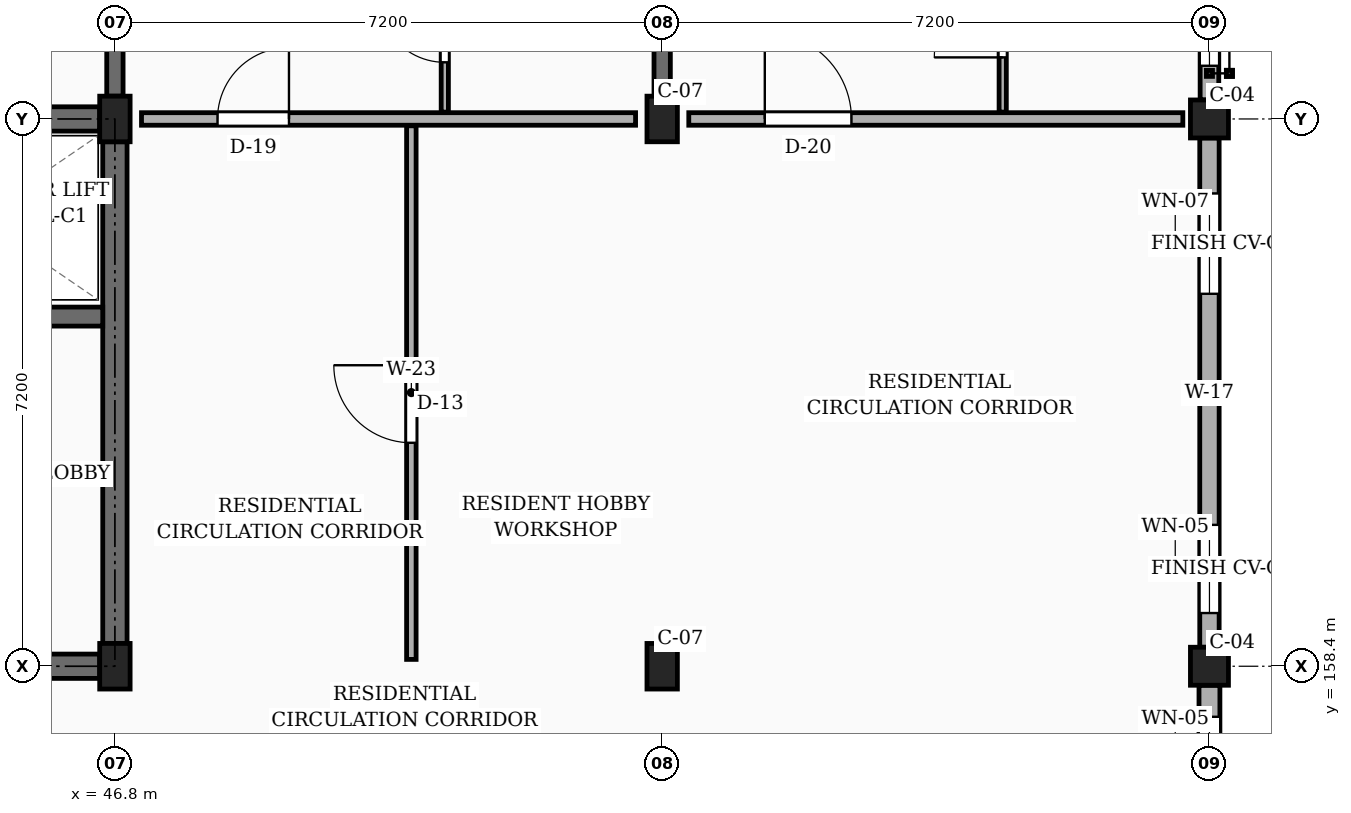
"""IFC4 building model, lengths in metres.
Left out: names, types, materials, properties, quantities, classifications, styles, units other than length and angle.
Written with IfcOpenShell. Run it as: python <this file> out.ifc"""

import sys

from ifc_helpers import new_model, si_unit, direction, frame, frame_2d, origin, origin_2d, place, context, subcontext, project, spatial, rectangle, extrude, element, fill, save


model = new_model("IFC4")
c1 = context("Model", 3, precision=1e-05, world=origin(), true_north=direction((0.0, 1.0)))
c2 = subcontext(c1, "Body", "Model", "MODEL_VIEW")
j1 = project(units=[si_unit("LENGTHUNIT", "METRE"), si_unit("PLANEANGLEUNIT", "RADIAN")], contexts=[c1])
p1 = place(None, origin())
s1 = spatial("IfcSite", under=j1, at=p1, CompositionType="ELEMENT")
p2 = place(p1, origin())
s2 = spatial("IfcBuilding", under=s1, at=p2, CompositionType="ELEMENT")
p3 = place(p2, frame((0.0, 0.0, 32.85)))
s3 = spatial("IfcBuildingStorey", under=s2, at=p3, CompositionType="ELEMENT", Elevation=32.85)
for number, where, z_axis, x_axis in (
    (1, (46.8, 158.4, 0.0), (0.0, 0.0, 1.0), (1.0, 0.0, 0.0)),
    (2, (46.8, 165.6, 0.0), (0.0, 0.0, 1.0), (1.0, 0.0, 0.0)),
    (3, (54.0, 158.4, 0.0), (0.0, 0.0, 1.0), (1.0, 0.0, 0.0)),
    (4, (54.0, 165.6, 0.0), (0.0, 0.0, 1.0), (1.0, 0.0, 0.0)),
):
    element("IfcColumn", number, at=place(p3, frame(where, z_axis=z_axis, x_axis=x_axis)), inside=s3, PredefinedType="COLUMN", context=c2, shape_type="SweptSolid", body=[
        extrude(rectangle(XDim=0.4, YDim=0.6, at=origin_2d()), origin(), (0.0, 0.0, 1.0), 3.15),
    ])
for number, where, z_axis, x_axis in (
    (5, (61.2, 158.4, 0.0), (0.0, 0.0, 1.0), (1.0, 0.0, 0.0)),
    (6, (61.2, 165.6, 0.0), (0.0, 0.0, 1.0), (1.0, 0.0, 0.0)),
):
    element("IfcColumn", number, at=place(p3, frame(where, z_axis=z_axis, x_axis=x_axis)), inside=s3, PredefinedType="COLUMN", context=c2, shape_type="SweptSolid", body=[
        extrude(rectangle(XDim=0.5, YDim=0.5, at=origin_2d()), origin(), (0.0, 0.0, 1.0), 3.15),
    ])
for number, where, z_axis, x_axis in (
    (7, (46.8, 165.9, 0.0), (0.0, 0.0, 1.0), (0.0, 1.0, 0.0)),
    (8, (54.0, 165.9, 0.0), (0.0, 0.0, 1.0), (0.0, 1.0, 0.0)),
):
    element("IfcWall", number, at=place(p3, frame(where, z_axis=z_axis, x_axis=x_axis)), inside=s3, PredefinedType="SOLIDWALL", context=c2, shape_type="SweptSolid", body=[
        extrude(rectangle(XDim=6.65, YDim=0.215, at=frame_2d((3.325, 0.0))), origin(), (0.0, 0.0, 1.0), 2.185),
    ])
p4 = place(p3, frame((61.2, 151.45, 0.0), z_axis=(0.0, 0.0, 1.0), x_axis=(0.0, 1.0, 0.0)))
e9 = element("IfcWall", 9, at=p4, inside=s3, PredefinedType="SOLIDWALL", context=c2, shape_type="SweptSolid", body=[
    extrude(rectangle(XDim=6.7, YDim=0.275, at=frame_2d((3.35, 0.0))), origin(), (0.0, 0.0, 1.0), 2.455),
])
p5 = place(p4, frame((1.995, 0.0, 0.78)))
e10 = element("IfcOpeningElement", 10, at=p5, cuts=e9, PredefinedType="OPENING", context=c2, shape_type="SweptSolid", body=[
    extrude(rectangle(XDim=1.0, YDim=1.15, at=frame_2d((0.5, 0.575))), frame((0.0, 0.147, 0.0), z_axis=(0.0, -1.0, 0.0), x_axis=(1.0, 0.0, 0.0)), (0.0, 0.0, 1.0), 0.295),
])
p6 = place(p4, frame((5.125, 0.0, 0.78)))
e11 = element("IfcOpeningElement", 11, at=p6, cuts=e9, PredefinedType="OPENING", context=c2, shape_type="SweptSolid", body=[
    extrude(rectangle(XDim=1.16, YDim=1.15, at=frame_2d((0.58, 0.575))), frame((0.0, 0.147, 0.0), z_axis=(0.0, -1.0, 0.0), x_axis=(1.0, 0.0, 0.0)), (0.0, 0.0, 1.0), 0.295),
])
p7 = place(p3, frame((61.2, 158.65, 0.0), z_axis=(0.0, 0.0, 1.0), x_axis=(0.0, 1.0, 0.0)))
e12 = element("IfcWall", 12, at=p7, inside=s3, PredefinedType="SOLIDWALL", context=c2, shape_type="SweptSolid", body=[
    extrude(rectangle(XDim=6.7, YDim=0.255, at=frame_2d((3.35, 0.0))), origin(), (0.0, 0.0, 1.0), 2.455),
])
p8 = place(p7, frame((0.45, 0.0, 0.78)))
e13 = element("IfcOpeningElement", 13, at=p8, cuts=e12, PredefinedType="OPENING", context=c2, shape_type="SweptSolid", body=[
    extrude(rectangle(XDim=1.16, YDim=1.15, at=frame_2d((0.58, 0.575))), frame((0.0, 0.137, 0.0), z_axis=(0.0, -1.0, 0.0), x_axis=(1.0, 0.0, 0.0)), (0.0, 0.0, 1.0), 0.275),
])
p9 = place(p7, frame((4.65, 0.0, 0.78)))
e14 = element("IfcOpeningElement", 14, at=p9, cuts=e12, PredefinedType="OPENING", context=c2, shape_type="SweptSolid", body=[
    extrude(rectangle(XDim=1.32, YDim=1.15, at=frame_2d((0.66, 0.575))), frame((0.0, 0.137, 0.0), z_axis=(0.0, -1.0, 0.0), x_axis=(1.0, 0.0, 0.0)), (0.0, 0.0, 1.0), 0.275),
])
p10 = place(p3, frame((61.2, 165.85, 0.0), z_axis=(0.0, 0.0, 1.0), x_axis=(0.0, 1.0, 0.0)))
e15 = element("IfcWall", 15, at=p10, inside=s3, PredefinedType="SOLIDWALL", context=c2, shape_type="SweptSolid", body=[
    extrude(rectangle(XDim=6.7, YDim=0.245, at=frame_2d((3.35, 0.0))), origin(), (0.0, 0.0, 1.0), 2.455),
])
p11 = place(p10, frame((0.45, 0.0, 0.78)))
e16 = element("IfcOpeningElement", 16, at=p11, cuts=e15, PredefinedType="OPENING", context=c2, shape_type="SweptSolid", body=[
    extrude(rectangle(XDim=1.32, YDim=1.15, at=frame_2d((0.66, 0.575))), frame((0.0, 0.133, 0.0), z_axis=(0.0, -1.0, 0.0), x_axis=(1.0, 0.0, 0.0)), (0.0, 0.0, 1.0), 0.265),
])
p12 = place(p10, frame((4.65, 0.0, 0.78)))
e17 = element("IfcOpeningElement", 17, at=p12, cuts=e15, PredefinedType="OPENING", context=c2, shape_type="SweptSolid", body=[
    extrude(rectangle(XDim=0.88, YDim=1.26, at=frame_2d((0.44, 0.63))), frame((0.0, 0.133, 0.0), z_axis=(0.0, -1.0, 0.0), x_axis=(1.0, 0.0, 0.0)), (0.0, 0.0, 1.0), 0.265),
])
p13 = place(p3, frame((39.8, 165.6, 0.0), z_axis=(0.0, 0.0, 1.0), x_axis=(1.0, 0.0, 0.0)))
e18 = element("IfcWall", 18, at=p13, inside=s3, PredefinedType="SHEAR", context=c2, shape_type="SweptSolid", body=[
    extrude(rectangle(XDim=6.8, YDim=0.32, at=frame_2d((3.4, 0.0))), origin(), (0.0, 0.0, 1.0), 2.885),
])
p14 = place(p3, frame((46.8, 158.7, 0.0), z_axis=(0.0, 0.0, 1.0), x_axis=(0.0, 1.0, 0.0)))
e19 = element("IfcWall", 19, at=p14, inside=s3, PredefinedType="SHEAR", context=c2, shape_type="SweptSolid", body=[
    extrude(rectangle(XDim=6.6, YDim=0.32, at=frame_2d((3.3, 0.0))), origin(), (0.0, 0.0, 1.0), 2.885),
])
p15 = place(p3, frame((39.8, 158.4, 0.0), z_axis=(0.0, 0.0, 1.0), x_axis=(1.0, 0.0, 0.0)))
e20 = element("IfcWall", 20, at=p15, inside=s3, PredefinedType="SHEAR", context=c2, shape_type="SweptSolid", body=[
    extrude(rectangle(XDim=6.8, YDim=0.32, at=frame_2d((3.4, 0.0))), origin(), (0.0, 0.0, 1.0), 2.885),
])
p16 = place(p15, frame((4.55, 0.0, 0.0)))
e21 = element("IfcOpeningElement", 21, at=p16, cuts=e20, PredefinedType="OPENING", context=c2, shape_type="SweptSolid", body=[
    extrude(rectangle(XDim=1.1, YDim=2.15, at=frame_2d((0.55, 1.075))), frame((0.0, 0.17, 0.0), z_axis=(0.0, -1.0, 0.0), x_axis=(1.0, 0.0, 0.0)), (0.0, 0.0, 1.0), 0.34),
])
p17 = place(p3, frame((43.325, 163.0, 0.0), z_axis=(0.0, 0.0, 1.0), x_axis=(1.0, 0.0, 0.0)))
e22 = element("IfcWall", 22, at=p17, inside=s3, PredefinedType="SHEAR", context=c2, shape_type="SweptSolid", body=[
    extrude(rectangle(XDim=3.315, YDim=0.25, at=frame_2d((1.657, 0.0))), origin(), (0.0, 0.0, 1.0), 2.885),
])
p18 = place(p17, frame((1.1, 0.0, 0.0)))
e23 = element("IfcOpeningElement", 23, at=p18, cuts=e22, PredefinedType="OPENING", context=c2, shape_type="SweptSolid", body=[
    extrude(rectangle(XDim=1.0, YDim=2.2, at=frame_2d((0.5, 1.1))), frame((0.0, 0.135, 0.0), z_axis=(0.0, -1.0, 0.0), x_axis=(1.0, 0.0, 0.0)), (0.0, 0.0, 1.0), 0.27),
])
p19 = place(p3, frame((47.15, 165.6, 0.0), z_axis=(0.0, 0.0, 1.0), x_axis=(1.0, 0.0, 0.0)))
e24 = element("IfcWall", 24, at=p19, inside=s3, PredefinedType="PARTITIONING", context=c2, shape_type="SweptSolid", body=[
    extrude(rectangle(XDim=6.5, YDim=0.165, at=frame_2d((3.25, 0.0))), origin(), (0.0, 0.0, 1.0), 2.32),
])
p20 = place(p19, frame((1.0, 0.0, 0.0)))
e25 = element("IfcOpeningElement", 25, at=p20, cuts=e24, PredefinedType="OPENING", context=c2, shape_type="SweptSolid", body=[
    extrude(rectangle(XDim=0.94, YDim=2.12, at=frame_2d((0.47, 1.06))), frame((0.0, 0.093, 0.0), z_axis=(0.0, -1.0, 0.0), x_axis=(1.0, 0.0, 0.0)), (0.0, 0.0, 1.0), 0.185),
])
p21 = place(p3, frame((54.35, 165.6, 0.0), z_axis=(0.0, 0.0, 1.0), x_axis=(1.0, 0.0, 0.0)))
e26 = element("IfcWall", 26, at=p21, inside=s3, PredefinedType="PARTITIONING", context=c2, shape_type="SweptSolid", body=[
    extrude(rectangle(XDim=6.5, YDim=0.165, at=frame_2d((3.25, 0.0))), origin(), (0.0, 0.0, 1.0), 2.32),
])
p22 = place(p21, frame((1.0, 0.0, 0.0)))
e27 = element("IfcOpeningElement", 27, at=p22, cuts=e26, PredefinedType="OPENING", context=c2, shape_type="SweptSolid", body=[
    extrude(rectangle(XDim=1.14, YDim=2.18, at=frame_2d((0.57, 1.09))), frame((0.0, 0.093, 0.0), z_axis=(0.0, -1.0, 0.0), x_axis=(1.0, 0.0, 0.0)), (0.0, 0.0, 1.0), 0.185),
])
p23 = place(p3, frame((50.7, 158.49, 0.0), z_axis=(0.0, 0.0, 1.0), x_axis=(0.0, 1.0, 0.0)))
e28 = element("IfcWall", 28, at=p23, inside=s3, PredefinedType="PARTITIONING", context=c2, shape_type="SweptSolid", body=[
    extrude(rectangle(XDim=7.02, YDim=0.125, at=frame_2d((3.51, 0.0))), origin(), (0.0, 0.0, 1.0), 2.32),
])
p24 = place(p23, frame((2.85, 0.0, 0.0)))
e29 = element("IfcOpeningElement", 29, at=p24, cuts=e28, PredefinedType="OPENING", context=c2, shape_type="SweptSolid", body=[
    extrude(rectangle(XDim=1.02, YDim=2.15, at=frame_2d((0.51, 1.075))), frame((0.0, 0.073, 0.0), z_axis=(0.0, -1.0, 0.0), x_axis=(1.0, 0.0, 0.0)), (0.0, 0.0, 1.0), 0.145),
])
p25 = place(p3, frame((51.14, 165.69, 0.0), z_axis=(0.0, 0.0, 1.0), x_axis=(0.0, 1.0, 0.0)))
e30 = element("IfcWall", 30, at=p25, inside=s3, PredefinedType="PARTITIONING", context=c2, shape_type="SweptSolid", body=[
    extrude(rectangle(XDim=2.18, YDim=0.095, at=frame_2d((1.09, 0.0))), origin(), (0.0, 0.0, 1.0), 2.32),
])
p26 = place(p25, frame((0.655, 0.0, 0.0)))
e31 = element("IfcOpeningElement", 31, at=p26, cuts=e30, PredefinedType="OPENING", context=c2, shape_type="SweptSolid", body=[
    extrude(rectangle(XDim=0.87, YDim=2.05, at=frame_2d((0.435, 1.025))), frame((0.0, 0.058, 0.0), z_axis=(0.0, -1.0, 0.0), x_axis=(1.0, 0.0, 0.0)), (0.0, 0.0, 1.0), 0.115),
])
p27 = place(p3, frame((58.48, 165.69, 0.0), z_axis=(0.0, 0.0, 1.0), x_axis=(0.0, 1.0, 0.0)))
e32 = element("IfcWall", 32, at=p27, inside=s3, PredefinedType="PARTITIONING", context=c2, shape_type="SweptSolid", body=[
    extrude(rectangle(XDim=2.34, YDim=0.095, at=frame_2d((1.17, 0.0))), origin(), (0.0, 0.0, 1.0), 2.32),
])
p28 = place(p27, frame((0.72, 0.0, 0.0)))
e33 = element("IfcOpeningElement", 33, at=p28, cuts=e32, PredefinedType="OPENING", context=c2, shape_type="SweptSolid", body=[
    extrude(rectangle(XDim=0.9, YDim=2.05, at=frame_2d((0.45, 1.025))), frame((0.0, 0.058, 0.0), z_axis=(0.0, -1.0, 0.0), x_axis=(1.0, 0.0, 0.0)), (0.0, 0.0, 1.0), 0.115),
])
p29 = place(p6, origin())
e34 = element("IfcWindow", 34, at=p29, inside=s3, PartitioningType="SINGLE_PANEL", PredefinedType="WINDOW", context=c2, shape_type="SweptSolid", body=[
    extrude(rectangle(XDim=1.16, YDim=1.15, at=frame_2d((0.58, 0.575))), frame((0.0, 0.03, 0.0), z_axis=(0.0, -1.0, 0.0), x_axis=(1.0, 0.0, 0.0)), (0.0, 0.0, 1.0), 0.06),
])
fill(e11, e34)
p30 = place(p8, origin())
e35 = element("IfcWindow", 35, at=p30, inside=s3, PartitioningType="SINGLE_PANEL", PredefinedType="WINDOW", context=c2, shape_type="SweptSolid", body=[
    extrude(rectangle(XDim=1.16, YDim=1.15, at=frame_2d((0.58, 0.575))), frame((0.0, 0.03, 0.0), z_axis=(0.0, -1.0, 0.0), x_axis=(1.0, 0.0, 0.0)), (0.0, 0.0, 1.0), 0.06),
])
fill(e13, e35)
p31 = place(p9, origin())
e36 = element("IfcWindow", 36, at=p31, inside=s3, PartitioningType="SINGLE_PANEL", PredefinedType="WINDOW", context=c2, shape_type="SweptSolid", body=[
    extrude(rectangle(XDim=1.32, YDim=1.15, at=frame_2d((0.66, 0.575))), frame((0.0, 0.03, 0.0), z_axis=(0.0, -1.0, 0.0), x_axis=(1.0, 0.0, 0.0)), (0.0, 0.0, 1.0), 0.06),
])
fill(e14, e36)
p32 = place(p11, origin())
e37 = element("IfcWindow", 37, at=p32, inside=s3, PartitioningType="SINGLE_PANEL", PredefinedType="WINDOW", context=c2, shape_type="SweptSolid", body=[
    extrude(rectangle(XDim=1.32, YDim=1.15, at=frame_2d((0.66, 0.575))), frame((0.0, 0.03, 0.0), z_axis=(0.0, -1.0, 0.0), x_axis=(1.0, 0.0, 0.0)), (0.0, 0.0, 1.0), 0.06),
])
fill(e16, e37)
p33 = place(p20, origin())
e38 = element("IfcDoor", 38, at=p33, inside=s3, OperationType="SINGLE_SWING_RIGHT", PredefinedType="DOOR", context=c2, shape_type="SweptSolid", body=[
    extrude(rectangle(XDim=0.94, YDim=2.12, at=frame_2d((0.47, 1.06))), frame((0.0, 0.025, 0.0), z_axis=(0.0, -1.0, 0.0), x_axis=(1.0, 0.0, 0.0)), (0.0, 0.0, 1.0), 0.05),
])
fill(e25, e38)
p34 = place(p22, origin())
e39 = element("IfcDoor", 39, at=p34, inside=s3, OperationType="SINGLE_SWING_LEFT", PredefinedType="DOOR", context=c2, shape_type="SweptSolid", body=[
    extrude(rectangle(XDim=1.14, YDim=2.18, at=frame_2d((0.57, 1.09))), frame((0.0, 0.025, 0.0), z_axis=(0.0, -1.0, 0.0), x_axis=(1.0, 0.0, 0.0)), (0.0, 0.0, 1.0), 0.05),
])
fill(e27, e39)
p35 = place(p24, origin())
e40 = element("IfcDoor", 40, at=p35, inside=s3, OperationType="SINGLE_SWING_RIGHT", PredefinedType="DOOR", context=c2, shape_type="SweptSolid", body=[
    extrude(rectangle(XDim=1.02, YDim=2.15, at=frame_2d((0.51, 1.075))), frame((0.0, 0.025, 0.0), z_axis=(0.0, -1.0, 0.0), x_axis=(1.0, 0.0, 0.0)), (0.0, 0.0, 1.0), 0.05),
])
fill(e29, e40)
p36 = place(p26, origin())
e41 = element("IfcDoor", 41, at=p36, inside=s3, OperationType="SINGLE_SWING_RIGHT", PredefinedType="DOOR", context=c2, shape_type="SweptSolid", body=[
    extrude(rectangle(XDim=0.87, YDim=2.05, at=frame_2d((0.435, 1.025))), frame((0.0, 0.025, 0.0), z_axis=(0.0, -1.0, 0.0), x_axis=(1.0, 0.0, 0.0)), (0.0, 0.0, 1.0), 0.05),
])
fill(e31, e41)
p37 = place(p28, origin())
e42 = element("IfcDoor", 42, at=p37, inside=s3, OperationType="SINGLE_SWING_LEFT", PredefinedType="DOOR", context=c2, shape_type="SweptSolid", body=[
    extrude(rectangle(XDim=0.9, YDim=2.05, at=frame_2d((0.45, 1.025))), frame((0.0, 0.025, 0.0), z_axis=(0.0, -1.0, 0.0), x_axis=(1.0, 0.0, 0.0)), (0.0, 0.0, 1.0), 0.05),
])
fill(e33, e42)
save(model, sys.argv[1])
